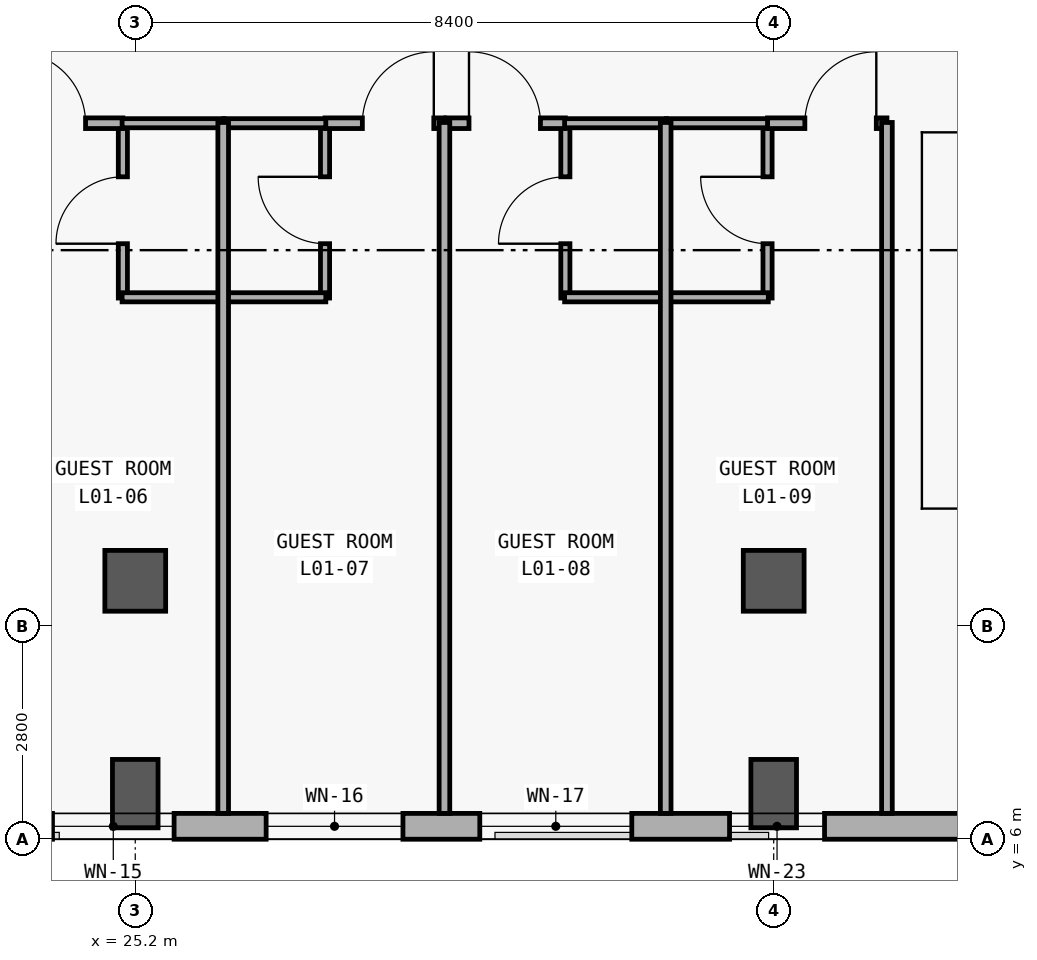
"""IFC4 building model, lengths in metres.
Left out: names, types, materials, properties, quantities, classifications, styles, units other than length and angle.
Written with IfcOpenShell. Run it as: python <this file> out.ifc"""

import sys

from ifc_helpers import new_model, si_unit, direction, frame, frame_2d, origin, origin_2d, place, context, subcontext, project, spatial, rectangle, extrude, element, fill, save


model = new_model("IFC4")
c1 = context("Model", 3, precision=1e-05, world=origin(), true_north=direction((0.0, 1.0)))
c2 = subcontext(c1, "Body", "Model", "MODEL_VIEW")
j1 = project(units=[si_unit("LENGTHUNIT", "METRE"), si_unit("PLANEANGLEUNIT", "RADIAN")], contexts=[c1])
p1 = place(None, origin())
s1 = spatial("IfcSite", under=j1, at=p1, CompositionType="ELEMENT")
p2 = place(p1, origin())
s2 = spatial("IfcBuilding", under=s1, at=p2, CompositionType="ELEMENT")
p3 = place(p2, frame((0.0, 0.0, 5.4)))
s3 = spatial("IfcBuildingStorey", under=s2, at=p3, CompositionType="ELEMENT", Elevation=5.4)
p4 = place(p3, frame((25.2, 6.6, 0.0), z_axis=(0.0, 0.0, 1.0), x_axis=(0.0, 1.0, 0.0)))
e1 = element("IfcColumn", 1, at=p4, inside=s3, PredefinedType="COLUMN", context=c2, shape_type="SweptSolid", body=[
    extrude(rectangle(XDim=0.6, YDim=0.9, at=origin_2d()), origin(), (0.0, 0.0, 1.0), 5.4),
])
p5 = place(p3, frame((25.2, 9.4, 0.0), z_axis=(0.0, 0.0, 1.0), x_axis=(1.0, 0.0, 0.0)))
e2 = element("IfcColumn", 2, at=p5, inside=s3, PredefinedType="COLUMN", context=c2, shape_type="SweptSolid", body=[
    extrude(rectangle(XDim=0.8, YDim=0.8, at=origin_2d()), origin(), (0.0, 0.0, 1.0), 5.4),
])
p6 = place(p3, frame((33.6, 6.6, 0.0), z_axis=(0.0, 0.0, 1.0), x_axis=(0.0, 1.0, 0.0)))
e3 = element("IfcColumn", 3, at=p6, inside=s3, PredefinedType="COLUMN", context=c2, shape_type="SweptSolid", body=[
    extrude(rectangle(XDim=0.6, YDim=0.9, at=origin_2d()), origin(), (0.0, 0.0, 1.0), 5.4),
])
p7 = place(p3, frame((33.6, 9.4, 0.0), z_axis=(0.0, 0.0, 1.0), x_axis=(1.0, 0.0, 0.0)))
e4 = element("IfcColumn", 4, at=p7, inside=s3, PredefinedType="COLUMN", context=c2, shape_type="SweptSolid", body=[
    extrude(rectangle(XDim=0.8, YDim=0.8, at=origin_2d()), origin(), (0.0, 0.0, 1.0), 5.4),
])
p8 = place(p3, frame((92.06, 6.17, 0.0), z_axis=(0.0, 0.0, 1.0), x_axis=(-1.0, 0.0, 0.0)))
e5 = element("IfcWall", 5, at=p8, inside=s3, PredefinedType="SOLIDWALL", context=c2, shape_type="SweptSolid", body=[
    extrude(rectangle(XDim=83.32, YDim=0.34, at=frame_2d((41.66, 0.0))), origin(), (0.0, 0.0, 1.0), 5.1),
])
p9 = place(p8, frame((80.804, 0.0, 0.85)))
e6 = element("IfcOpeningElement", 6, at=p9, cuts=e5, PredefinedType="OPENING", context=c2, shape_type="SweptSolid", body=[
    extrude(rectangle(XDim=1.8, YDim=1.8, at=frame_2d((0.9, 0.9))), frame((0.0, 0.18, 0.0), z_axis=(0.0, -1.0, 0.0), x_axis=(1.0, 0.0, 0.0)), (0.0, 0.0, 1.0), 0.36),
])
p10 = place(p8, frame((78.043, 0.0, 0.85)))
e7 = element("IfcOpeningElement", 7, at=p10, cuts=e5, PredefinedType="OPENING", context=c2, shape_type="SweptSolid", body=[
    extrude(rectangle(XDim=1.5, YDim=1.75, at=frame_2d((0.75, 0.875))), frame((0.0, 0.18, 0.0), z_axis=(0.0, -1.0, 0.0), x_axis=(1.0, 0.0, 0.0)), (0.0, 0.0, 1.0), 0.36),
])
p11 = place(p8, frame((75.057, 0.0, 0.85)))
e8 = element("IfcOpeningElement", 8, at=p11, cuts=e5, PredefinedType="OPENING", context=c2, shape_type="SweptSolid", body=[
    extrude(rectangle(XDim=1.65, YDim=1.75, at=frame_2d((0.825, 0.875))), frame((0.0, 0.18, 0.0), z_axis=(0.0, -1.0, 0.0), x_axis=(1.0, 0.0, 0.0)), (0.0, 0.0, 1.0), 0.36),
])
p12 = place(p8, frame((71.997, 0.0, 0.85)))
e9 = element("IfcOpeningElement", 9, at=p12, cuts=e5, PredefinedType="OPENING", context=c2, shape_type="SweptSolid", body=[
    extrude(rectangle(XDim=1.95, YDim=1.75, at=frame_2d((0.975, 0.875))), frame((0.0, 0.18, 0.0), z_axis=(0.0, -1.0, 0.0), x_axis=(1.0, 0.0, 0.0)), (0.0, 0.0, 1.0), 0.36),
])
p13 = place(p8, frame((69.36, 0.0, 0.85)))
e10 = element("IfcOpeningElement", 10, at=p13, cuts=e5, PredefinedType="OPENING", context=c2, shape_type="SweptSolid", body=[
    extrude(rectangle(XDim=1.4, YDim=1.6, at=frame_2d((0.7, 0.8))), frame((0.0, 0.18, 0.0), z_axis=(0.0, -1.0, 0.0), x_axis=(1.0, 0.0, 0.0)), (0.0, 0.0, 1.0), 0.36),
])
p14 = place(p8, frame((66.349, 0.0, 0.85)))
e11 = element("IfcOpeningElement", 11, at=p14, cuts=e5, PredefinedType="OPENING", context=c2, shape_type="SweptSolid", body=[
    extrude(rectangle(XDim=1.6, YDim=1.6, at=frame_2d((0.8, 0.8))), frame((0.0, 0.18, 0.0), z_axis=(0.0, -1.0, 0.0), x_axis=(1.0, 0.0, 0.0)), (0.0, 0.0, 1.0), 0.36),
])
p15 = place(p8, frame((63.338, 0.0, 0.85)))
e12 = element("IfcOpeningElement", 12, at=p15, cuts=e5, PredefinedType="OPENING", context=c2, shape_type="SweptSolid", body=[
    extrude(rectangle(XDim=1.8, YDim=1.6, at=frame_2d((0.9, 0.8))), frame((0.0, 0.18, 0.0), z_axis=(0.0, -1.0, 0.0), x_axis=(1.0, 0.0, 0.0)), (0.0, 0.0, 1.0), 0.36),
])
p16 = place(p8, frame((60.327, 0.0, 0.85)))
e13 = element("IfcOpeningElement", 13, at=p16, cuts=e5, PredefinedType="OPENING", context=c2, shape_type="SweptSolid", body=[
    extrude(rectangle(XDim=2.0, YDim=1.65, at=frame_2d((1.0, 0.825))), frame((0.0, 0.18, 0.0), z_axis=(0.0, -1.0, 0.0), x_axis=(1.0, 0.0, 0.0)), (0.0, 0.0, 1.0), 0.36),
])
p17 = place(p8, frame((57.791, 0.0, 0.85)))
e14 = element("IfcOpeningElement", 14, at=p17, cuts=e5, PredefinedType="OPENING", context=c2, shape_type="SweptSolid", body=[
    extrude(rectangle(XDim=1.25, YDim=1.45, at=frame_2d((0.625, 0.725))), frame((0.0, 0.18, 0.0), z_axis=(0.0, -1.0, 0.0), x_axis=(1.0, 0.0, 0.0)), (0.0, 0.0, 1.0), 0.36),
])
p18 = place(p8, frame((38.744, 0.0, 0.85)))
e15 = element("IfcOpeningElement", 15, at=p18, cuts=e5, PredefinedType="OPENING", context=c2, shape_type="SweptSolid", body=[
    extrude(rectangle(XDim=3.3, YDim=2.15, at=frame_2d((1.65, 1.075))), frame((0.0, 0.18, 0.0), z_axis=(0.0, -1.0, 0.0), x_axis=(1.0, 0.0, 0.0)), (0.0, 0.0, 1.0), 0.36),
])
p19 = place(p8, frame((35.07, 0.0, 0.85)))
e16 = element("IfcOpeningElement", 16, at=p19, cuts=e5, PredefinedType="OPENING", context=c2, shape_type="SweptSolid", body=[
    extrude(rectangle(XDim=1.18, YDim=1.5, at=frame_2d((0.59, 0.75))), frame((0.0, 0.18, 0.0), z_axis=(0.0, -1.0, 0.0), x_axis=(1.0, 0.0, 0.0)), (0.0, 0.0, 1.0), 0.36),
])
p20 = place(p8, frame((30.287, 0.0, 0.85)))
e17 = element("IfcOpeningElement", 17, at=p20, cuts=e5, PredefinedType="OPENING", context=c2, shape_type="SweptSolid", body=[
    extrude(rectangle(XDim=1.28, YDim=1.6, at=frame_2d((0.64, 0.8))), frame((0.0, 0.18, 0.0), z_axis=(0.0, -1.0, 0.0), x_axis=(1.0, 0.0, 0.0)), (0.0, 0.0, 1.0), 0.36),
])
p21 = place(p8, frame((25.503, 0.0, 0.85)))
e18 = element("IfcOpeningElement", 18, at=p21, cuts=e5, PredefinedType="OPENING", context=c2, shape_type="SweptSolid", body=[
    extrude(rectangle(XDim=1.38, YDim=1.7, at=frame_2d((0.69, 0.85))), frame((0.0, 0.18, 0.0), z_axis=(0.0, -1.0, 0.0), x_axis=(1.0, 0.0, 0.0)), (0.0, 0.0, 1.0), 0.36),
])
p22 = place(p8, frame((20.72, 0.0, 0.85)))
e19 = element("IfcOpeningElement", 19, at=p22, cuts=e5, PredefinedType="OPENING", context=c2, shape_type="SweptSolid", body=[
    extrude(rectangle(XDim=1.48, YDim=1.8, at=frame_2d((0.74, 0.9))), frame((0.0, 0.18, 0.0), z_axis=(0.0, -1.0, 0.0), x_axis=(1.0, 0.0, 0.0)), (0.0, 0.0, 1.0), 0.36),
])
p23 = place(p8, frame((15.937, 0.0, 0.85)))
e20 = element("IfcOpeningElement", 20, at=p23, cuts=e5, PredefinedType="OPENING", context=c2, shape_type="SweptSolid", body=[
    extrude(rectangle(XDim=1.58, YDim=1.85, at=frame_2d((0.79, 0.925))), frame((0.0, 0.18, 0.0), z_axis=(0.0, -1.0, 0.0), x_axis=(1.0, 0.0, 0.0)), (0.0, 0.0, 1.0), 0.36),
])
p24 = place(p8, frame((11.154, 0.0, 0.85)))
e21 = element("IfcOpeningElement", 21, at=p24, cuts=e5, PredefinedType="OPENING", context=c2, shape_type="SweptSolid", body=[
    extrude(rectangle(XDim=1.68, YDim=1.9, at=frame_2d((0.84, 0.95))), frame((0.0, 0.18, 0.0), z_axis=(0.0, -1.0, 0.0), x_axis=(1.0, 0.0, 0.0)), (0.0, 0.0, 1.0), 0.36),
])
p25 = place(p8, frame((6.37, 0.0, 0.85)))
e22 = element("IfcOpeningElement", 22, at=p25, cuts=e5, PredefinedType="OPENING", context=c2, shape_type="SweptSolid", body=[
    extrude(rectangle(XDim=1.78, YDim=1.95, at=frame_2d((0.89, 0.975))), frame((0.0, 0.18, 0.0), z_axis=(0.0, -1.0, 0.0), x_axis=(1.0, 0.0, 0.0)), (0.0, 0.0, 1.0), 0.36),
])
p26 = place(p8, frame((1.586, 0.0, 0.85)))
e23 = element("IfcOpeningElement", 23, at=p26, cuts=e5, PredefinedType="OPENING", context=c2, shape_type="SweptSolid", body=[
    extrude(rectangle(XDim=1.88, YDim=1.95, at=frame_2d((0.94, 0.975))), frame((0.0, 0.18, 0.0), z_axis=(0.0, -1.0, 0.0), x_axis=(1.0, 0.0, 0.0)), (0.0, 0.0, 1.0), 0.36),
])
p27 = place(p3, frame((25.037, 13.12, 0.0), z_axis=(0.0, 0.0, 1.0), x_axis=(0.0, 1.0, 0.0)))
e24 = element("IfcWall", 24, at=p27, inside=s3, PredefinedType="PARTITIONING", context=c2, shape_type="SweptSolid", body=[
    extrude(rectangle(XDim=2.31, YDim=0.12, at=frame_2d((1.155, 0.0))), origin(), (0.0, 0.0, 1.0), 4.18),
])
p28 = place(p27, frame((0.715, 0.0, 0.0)))
e25 = element("IfcOpeningElement", 25, at=p28, cuts=e24, PredefinedType="OPENING", context=c2, shape_type="SweptSolid", body=[
    extrude(rectangle(XDim=0.88, YDim=2.15, at=frame_2d((0.44, 1.075))), frame((0.0, 0.07, 0.0), z_axis=(0.0, -1.0, 0.0), x_axis=(1.0, 0.0, 0.0)), (0.0, 0.0, 1.0), 0.14),
])
p29 = place(p3, frame((27.697, 13.12, 0.0), z_axis=(0.0, 0.0, 1.0), x_axis=(0.0, 1.0, 0.0)))
e26 = element("IfcWall", 26, at=p29, inside=s3, PredefinedType="PARTITIONING", context=c2, shape_type="SweptSolid", body=[
    extrude(rectangle(XDim=2.31, YDim=0.12, at=frame_2d((1.155, 0.0))), origin(), (0.0, 0.0, 1.0), 4.18),
])
p30 = place(p29, frame((0.715, 0.0, 0.0)))
e27 = element("IfcOpeningElement", 27, at=p30, cuts=e26, PredefinedType="OPENING", context=c2, shape_type="SweptSolid", body=[
    extrude(rectangle(XDim=0.88, YDim=2.15, at=frame_2d((0.44, 1.075))), frame((0.0, 0.07, 0.0), z_axis=(0.0, -1.0, 0.0), x_axis=(1.0, 0.0, 0.0)), (0.0, 0.0, 1.0), 0.14),
])
p31 = place(p3, frame((30.859, 13.12, 0.0), z_axis=(0.0, 0.0, 1.0), x_axis=(0.0, 1.0, 0.0)))
e28 = element("IfcWall", 28, at=p31, inside=s3, PredefinedType="PARTITIONING", context=c2, shape_type="SweptSolid", body=[
    extrude(rectangle(XDim=2.31, YDim=0.12, at=frame_2d((1.155, 0.0))), origin(), (0.0, 0.0, 1.0), 4.18),
])
p32 = place(p31, frame((0.715, 0.0, 0.0)))
e29 = element("IfcOpeningElement", 29, at=p32, cuts=e28, PredefinedType="OPENING", context=c2, shape_type="SweptSolid", body=[
    extrude(rectangle(XDim=0.88, YDim=2.15, at=frame_2d((0.44, 1.075))), frame((0.0, 0.07, 0.0), z_axis=(0.0, -1.0, 0.0), x_axis=(1.0, 0.0, 0.0)), (0.0, 0.0, 1.0), 0.14),
])
p33 = place(p3, frame((33.519, 13.12, 0.0), z_axis=(0.0, 0.0, 1.0), x_axis=(0.0, 1.0, 0.0)))
e30 = element("IfcWall", 30, at=p33, inside=s3, PredefinedType="PARTITIONING", context=c2, shape_type="SweptSolid", body=[
    extrude(rectangle(XDim=2.31, YDim=0.12, at=frame_2d((1.155, 0.0))), origin(), (0.0, 0.0, 1.0), 4.18),
])
p34 = place(p33, frame((0.715, 0.0, 0.0)))
e31 = element("IfcOpeningElement", 31, at=p34, cuts=e30, PredefinedType="OPENING", context=c2, shape_type="SweptSolid", body=[
    extrude(rectangle(XDim=0.88, YDim=2.15, at=frame_2d((0.44, 1.075))), frame((0.0, 0.07, 0.0), z_axis=(0.0, -1.0, 0.0), x_axis=(1.0, 0.0, 0.0)), (0.0, 0.0, 1.0), 0.14),
])
p35 = place(p3, frame((23.466, 15.42, 0.0), z_axis=(0.0, 0.0, 1.0), x_axis=(1.0, 0.0, 0.0)))
e32 = element("IfcWall", 32, at=p35, inside=s3, PredefinedType="PARTITIONING", context=c2, shape_type="SweptSolid", body=[
    extrude(rectangle(XDim=1.571, YDim=0.14, at=frame_2d((0.786, 0.0))), origin(), (0.0, 0.0, 1.0), 4.18),
])
p36 = place(p35, frame((0.14, 0.0, 0.0)))
e33 = element("IfcOpeningElement", 33, at=p36, cuts=e32, PredefinedType="OPENING", context=c2, shape_type="SweptSolid", body=[
    extrude(rectangle(XDim=0.94, YDim=2.2, at=frame_2d((0.47, 1.1))), frame((0.0, 0.08, 0.0), z_axis=(0.0, -1.0, 0.0), x_axis=(1.0, 0.0, 0.0)), (0.0, 0.0, 1.0), 0.16),
])
p37 = place(p3, frame((27.697, 15.42, 0.0), z_axis=(0.0, 0.0, 1.0), x_axis=(1.0, 0.0, 0.0)))
e34 = element("IfcWall", 34, at=p37, inside=s3, PredefinedType="PARTITIONING", context=c2, shape_type="SweptSolid", body=[
    extrude(rectangle(XDim=1.571, YDim=0.14, at=frame_2d((0.786, 0.0))), origin(), (0.0, 0.0, 1.0), 4.18),
])
p38 = place(p37, frame((0.491, 0.0, 0.0)))
e35 = element("IfcOpeningElement", 35, at=p38, cuts=e34, PredefinedType="OPENING", context=c2, shape_type="SweptSolid", body=[
    extrude(rectangle(XDim=0.94, YDim=2.2, at=frame_2d((0.47, 1.1))), frame((0.0, 0.08, 0.0), z_axis=(0.0, -1.0, 0.0), x_axis=(1.0, 0.0, 0.0)), (0.0, 0.0, 1.0), 0.16),
])
p39 = place(p3, frame((29.288, 15.42, 0.0), z_axis=(0.0, 0.0, 1.0), x_axis=(1.0, 0.0, 0.0)))
e36 = element("IfcWall", 36, at=p39, inside=s3, PredefinedType="PARTITIONING", context=c2, shape_type="SweptSolid", body=[
    extrude(rectangle(XDim=1.571, YDim=0.14, at=frame_2d((0.785, 0.0))), origin(), (0.0, 0.0, 1.0), 4.18),
])
p40 = place(p39, frame((0.303, 0.0, 0.0)))
e37 = element("IfcOpeningElement", 37, at=p40, cuts=e36, PredefinedType="OPENING", context=c2, shape_type="SweptSolid", body=[
    extrude(rectangle(XDim=0.94, YDim=2.2, at=frame_2d((0.47, 1.1))), frame((0.0, 0.08, 0.0), z_axis=(0.0, -1.0, 0.0), x_axis=(1.0, 0.0, 0.0)), (0.0, 0.0, 1.0), 0.16),
])
p41 = place(p3, frame((33.519, 15.42, 0.0), z_axis=(0.0, 0.0, 1.0), x_axis=(1.0, 0.0, 0.0)))
e38 = element("IfcWall", 38, at=p41, inside=s3, PredefinedType="PARTITIONING", context=c2, shape_type="SweptSolid", body=[
    extrude(rectangle(XDim=1.571, YDim=0.14, at=frame_2d((0.786, 0.0))), origin(), (0.0, 0.0, 1.0), 4.18),
])
p42 = place(p41, frame((0.491, 0.0, 0.0)))
e39 = element("IfcOpeningElement", 39, at=p42, cuts=e38, PredefinedType="OPENING", context=c2, shape_type="SweptSolid", body=[
    extrude(rectangle(XDim=0.94, YDim=2.2, at=frame_2d((0.47, 1.1))), frame((0.0, 0.08, 0.0), z_axis=(0.0, -1.0, 0.0), x_axis=(1.0, 0.0, 0.0)), (0.0, 0.0, 1.0), 0.16),
])
for number, where, z_axis, x_axis in (
    (40, (25.027, 13.13, 0.0), (0.0, 0.0, 1.0), (1.0, 0.0, 0.0)),
    (41, (25.027, 15.42, 0.0), (0.0, 0.0, 1.0), (1.0, 0.0, 0.0)),
):
    element("IfcWall", number, at=place(p3, frame(where, z_axis=z_axis, x_axis=x_axis)), inside=s3, PredefinedType="PARTITIONING", context=c2, shape_type="SweptSolid", body=[
        extrude(rectangle(XDim=1.34, YDim=0.12, at=frame_2d((0.67, 0.0))), origin(), (0.0, 0.0, 1.0), 4.18),
    ])
for number, where, z_axis, x_axis in (
    (42, (26.367, 13.13, 0.0), (0.0, 0.0, 1.0), (1.0, 0.0, 0.0)),
    (43, (26.367, 15.42, 0.0), (0.0, 0.0, 1.0), (1.0, 0.0, 0.0)),
):
    element("IfcWall", number, at=place(p3, frame(where, z_axis=z_axis, x_axis=x_axis)), inside=s3, PredefinedType="PARTITIONING", context=c2, shape_type="SweptSolid", body=[
        extrude(rectangle(XDim=1.34, YDim=0.12, at=frame_2d((0.67, 0.0))), origin(), (0.0, 0.0, 1.0), 4.18),
    ])
for number, where, z_axis, x_axis in (
    (44, (30.849, 13.13, 0.0), (0.0, 0.0, 1.0), (1.0, 0.0, 0.0)),
    (45, (30.849, 15.42, 0.0), (0.0, 0.0, 1.0), (1.0, 0.0, 0.0)),
):
    element("IfcWall", number, at=place(p3, frame(where, z_axis=z_axis, x_axis=x_axis)), inside=s3, PredefinedType="PARTITIONING", context=c2, shape_type="SweptSolid", body=[
        extrude(rectangle(XDim=1.34, YDim=0.12, at=frame_2d((0.67, 0.0))), origin(), (0.0, 0.0, 1.0), 4.18),
    ])
p43 = place(p3, frame((32.189, 13.13, 0.0), z_axis=(0.0, 0.0, 1.0), x_axis=(1.0, 0.0, 0.0)))
e46 = element("IfcWall", 46, at=p43, inside=s3, PredefinedType="PARTITIONING", context=c2, shape_type="SweptSolid", body=[
    extrude(rectangle(XDim=1.34, YDim=0.12, at=frame_2d((0.67, 0.0))), origin(), (0.0, 0.0, 1.0), 4.18),
])
p44 = place(p3, frame((32.189, 15.42, 0.0), z_axis=(0.0, 0.0, 1.0), x_axis=(1.0, 0.0, 0.0)))
e47 = element("IfcWall", 47, at=p44, inside=s3, PredefinedType="PARTITIONING", context=c2, shape_type="SweptSolid", body=[
    extrude(rectangle(XDim=1.33, YDim=0.12, at=frame_2d((0.665, 0.0))), origin(), (0.0, 0.0, 1.0), 4.18),
])
for number, where, z_axis, x_axis in (
    (48, (26.357, 6.34, 0.0), (0.0, 0.0, 1.0), (0.0, 1.0, 0.0)),
    (49, (29.268, 6.34, 0.0), (0.0, 0.0, 1.0), (0.0, 1.0, 0.0)),
    (50, (32.179, 6.34, 0.0), (0.0, 0.0, 1.0), (0.0, 1.0, 0.0)),
    (51, (35.09, 6.34, 0.0), (0.0, 0.0, 1.0), (0.0, 1.0, 0.0)),
):
    element("IfcWall", number, at=place(p3, frame(where, z_axis=z_axis, x_axis=x_axis)), inside=s3, PredefinedType="PARTITIONING", context=c2, shape_type="SweptSolid", body=[
        extrude(rectangle(XDim=9.09, YDim=0.14, at=frame_2d((4.545, 0.0))), origin(), (0.0, 0.0, 1.0), 4.18),
    ])
p45 = place(p14, origin())
e52 = element("IfcWindow", 52, at=p45, inside=s3, PartitioningType="SINGLE_PANEL", PredefinedType="WINDOW", context=c2, shape_type="SweptSolid", body=[
    extrude(rectangle(XDim=1.6, YDim=1.6, at=frame_2d((0.8, 0.8))), frame((0.0, 0.03, 0.0), z_axis=(0.0, -1.0, 0.0), x_axis=(1.0, 0.0, 0.0)), (0.0, 0.0, 1.0), 0.06),
])
fill(e11, e52)
p46 = place(p15, origin())
e53 = element("IfcWindow", 53, at=p46, inside=s3, PartitioningType="SINGLE_PANEL", PredefinedType="WINDOW", context=c2, shape_type="SweptSolid", body=[
    extrude(rectangle(XDim=1.8, YDim=1.6, at=frame_2d((0.9, 0.8))), frame((0.0, 0.03, 0.0), z_axis=(0.0, -1.0, 0.0), x_axis=(1.0, 0.0, 0.0)), (0.0, 0.0, 1.0), 0.06),
])
fill(e12, e53)
p47 = place(p16, origin())
e54 = element("IfcWindow", 54, at=p47, inside=s3, PartitioningType="SINGLE_PANEL", PredefinedType="WINDOW", context=c2, shape_type="SweptSolid", body=[
    extrude(rectangle(XDim=2.0, YDim=1.65, at=frame_2d((1.0, 0.825))), frame((0.0, 0.03, 0.0), z_axis=(0.0, -1.0, 0.0), x_axis=(1.0, 0.0, 0.0)), (0.0, 0.0, 1.0), 0.06),
])
fill(e13, e54)
p48 = place(p17, origin())
e55 = element("IfcWindow", 55, at=p48, inside=s3, PartitioningType="SINGLE_PANEL", PredefinedType="WINDOW", context=c2, shape_type="SweptSolid", body=[
    extrude(rectangle(XDim=1.25, YDim=1.45, at=frame_2d((0.625, 0.725))), frame((0.0, 0.03, 0.0), z_axis=(0.0, -1.0, 0.0), x_axis=(1.0, 0.0, 0.0)), (0.0, 0.0, 1.0), 0.06),
])
fill(e14, e55)
p49 = place(p28, origin())
e56 = element("IfcDoor", 56, at=p49, inside=s3, OperationType="SINGLE_SWING_LEFT", PredefinedType="DOOR", context=c2, shape_type="SweptSolid", body=[
    extrude(rectangle(XDim=0.88, YDim=2.15, at=frame_2d((0.44, 1.075))), frame((0.0, 0.025, 0.0), z_axis=(0.0, -1.0, 0.0), x_axis=(1.0, 0.0, 0.0)), (0.0, 0.0, 1.0), 0.05),
])
fill(e25, e56)
p50 = place(p30, origin())
e57 = element("IfcDoor", 57, at=p50, inside=s3, OperationType="SINGLE_SWING_RIGHT", PredefinedType="DOOR", context=c2, shape_type="SweptSolid", body=[
    extrude(rectangle(XDim=0.88, YDim=2.15, at=frame_2d((0.44, 1.075))), frame((0.0, 0.025, 0.0), z_axis=(0.0, -1.0, 0.0), x_axis=(1.0, 0.0, 0.0)), (0.0, 0.0, 1.0), 0.05),
])
fill(e27, e57)
p51 = place(p32, origin())
e58 = element("IfcDoor", 58, at=p51, inside=s3, OperationType="SINGLE_SWING_LEFT", PredefinedType="DOOR", context=c2, shape_type="SweptSolid", body=[
    extrude(rectangle(XDim=0.88, YDim=2.15, at=frame_2d((0.44, 1.075))), frame((0.0, 0.025, 0.0), z_axis=(0.0, -1.0, 0.0), x_axis=(1.0, 0.0, 0.0)), (0.0, 0.0, 1.0), 0.05),
])
fill(e29, e58)
p52 = place(p34, origin())
e59 = element("IfcDoor", 59, at=p52, inside=s3, OperationType="SINGLE_SWING_RIGHT", PredefinedType="DOOR", context=c2, shape_type="SweptSolid", body=[
    extrude(rectangle(XDim=0.88, YDim=2.15, at=frame_2d((0.44, 1.075))), frame((0.0, 0.025, 0.0), z_axis=(0.0, -1.0, 0.0), x_axis=(1.0, 0.0, 0.0)), (0.0, 0.0, 1.0), 0.05),
])
fill(e31, e59)
p53 = place(p36, origin())
e60 = element("IfcDoor", 60, at=p53, inside=s3, OperationType="SINGLE_SWING_LEFT", PredefinedType="DOOR", context=c2, shape_type="SweptSolid", body=[
    extrude(rectangle(XDim=0.94, YDim=2.2, at=frame_2d((0.47, 1.1))), frame((0.0, 0.025, 0.0), z_axis=(0.0, -1.0, 0.0), x_axis=(1.0, 0.0, 0.0)), (0.0, 0.0, 1.0), 0.05),
])
fill(e33, e60)
p54 = place(p38, origin())
e61 = element("IfcDoor", 61, at=p54, inside=s3, OperationType="SINGLE_SWING_RIGHT", PredefinedType="DOOR", context=c2, shape_type="SweptSolid", body=[
    extrude(rectangle(XDim=0.94, YDim=2.2, at=frame_2d((0.47, 1.1))), frame((0.0, 0.025, 0.0), z_axis=(0.0, -1.0, 0.0), x_axis=(1.0, 0.0, 0.0)), (0.0, 0.0, 1.0), 0.05),
])
fill(e35, e61)
p55 = place(p40, origin())
e62 = element("IfcDoor", 62, at=p55, inside=s3, OperationType="SINGLE_SWING_LEFT", PredefinedType="DOOR", context=c2, shape_type="SweptSolid", body=[
    extrude(rectangle(XDim=0.94, YDim=2.2, at=frame_2d((0.47, 1.1))), frame((0.0, 0.025, 0.0), z_axis=(0.0, -1.0, 0.0), x_axis=(1.0, 0.0, 0.0)), (0.0, 0.0, 1.0), 0.05),
])
fill(e37, e62)
p56 = place(p42, origin())
e63 = element("IfcDoor", 63, at=p56, inside=s3, OperationType="SINGLE_SWING_RIGHT", PredefinedType="DOOR", context=c2, shape_type="SweptSolid", body=[
    extrude(rectangle(XDim=0.94, YDim=2.2, at=frame_2d((0.47, 1.1))), frame((0.0, 0.025, 0.0), z_axis=(0.0, -1.0, 0.0), x_axis=(1.0, 0.0, 0.0)), (0.0, 0.0, 1.0), 0.05),
])
fill(e39, e63)
save(model, sys.argv[1])
